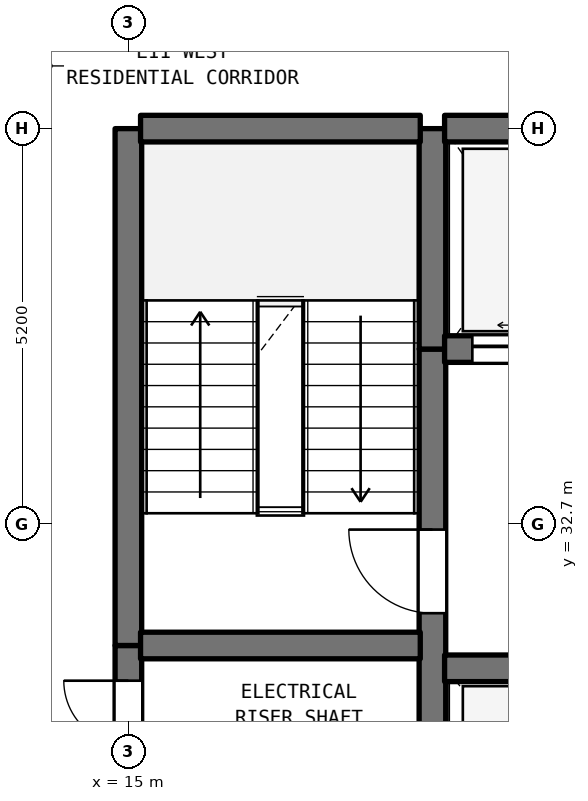
"""IFC4 building model, lengths in metres.
Left out: names, types, materials, properties, quantities, classifications, styles, units other than length and angle.
Written with IfcOpenShell. Run it as: python <this file> out.ifc"""

import sys

from ifc_helpers import new_model, si_unit, direction, frame, frame_2d, origin, place, context, subcontext, project, spatial, rectangle, extrude, element, fill, save


model = new_model("IFC4")
c1 = context("Model", 3, precision=1e-05, world=origin(), true_north=direction((0.0, 1.0)))
c2 = subcontext(c1, "Body", "Model", "MODEL_VIEW")
j1 = project(units=[si_unit("LENGTHUNIT", "METRE"), si_unit("PLANEANGLEUNIT", "RADIAN")], contexts=[c1])
p1 = place(None, origin())
s1 = spatial("IfcSite", under=j1, at=p1, CompositionType="ELEMENT")
p2 = place(p1, origin())
s2 = spatial("IfcBuilding", under=s1, at=p2, CompositionType="ELEMENT")
p3 = place(p2, frame((0.0, 0.0, 49.9)))
s3 = spatial("IfcBuildingStorey", under=s2, at=p3, CompositionType="ELEMENT", Elevation=49.9)
p4 = place(p3, frame((15.0, 29.5, 0.0), z_axis=(0.0, 0.0, 1.0), x_axis=(0.0, 1.0, 0.0)))
e1 = element("IfcWall", 1, at=p4, inside=s3, PredefinedType="SHEAR", context=c2, shape_type="SweptSolid", body=[
    extrude(rectangle(XDim=1.6, YDim=0.35, at=frame_2d((0.8, 0.0))), origin(), (0.0, 0.0, 1.0), 3.385),
])
p5 = place(p4, frame((0.287, 0.0, 0.0)))
e2 = element("IfcOpeningElement", 2, at=p5, cuts=e1, PredefinedType="OPENING", context=c2, shape_type="SweptSolid", body=[
    extrude(rectangle(XDim=0.85, YDim=2.1, at=frame_2d((0.425, 1.05))), frame((0.0, 0.185, 0.0), z_axis=(0.0, -1.0, 0.0), x_axis=(1.0, 0.0, 0.0)), (0.0, 0.0, 1.0), 0.37),
])
p6 = place(p3, frame((15.0, 31.1, 0.0), z_axis=(0.0, 0.0, 1.0), x_axis=(0.0, 1.0, 0.0)))
e3 = element("IfcWall", 3, at=p6, inside=s3, PredefinedType="SHEAR", context=c2, shape_type="SweptSolid", body=[
    extrude(rectangle(XDim=6.8, YDim=0.35, at=frame_2d((3.4, 0.0))), origin(), (0.0, 0.0, 1.0), 3.385),
])
p7 = place(p3, frame((19.0, 29.5, 0.0), z_axis=(0.0, 0.0, 1.0), x_axis=(0.0, 1.0, 0.0)))
e4 = element("IfcWall", 4, at=p7, inside=s3, PredefinedType="SHEAR", context=c2, shape_type="SweptSolid", body=[
    extrude(rectangle(XDim=5.5, YDim=0.35, at=frame_2d((2.75, 0.0))), origin(), (0.0, 0.0, 1.0), 3.385),
])
p8 = place(p7, frame((2.025, 0.0, 0.0)))
e5 = element("IfcOpeningElement", 5, at=p8, cuts=e4, PredefinedType="OPENING", context=c2, shape_type="SweptSolid", body=[
    extrude(rectangle(XDim=1.1, YDim=2.15, at=frame_2d((0.55, 1.075))), frame((0.0, 0.185, 0.0), z_axis=(0.0, -1.0, 0.0), x_axis=(1.0, 0.0, 0.0)), (0.0, 0.0, 1.0), 0.37),
])
p9 = place(p3, frame((19.0, 35.0, 0.0), z_axis=(0.0, 0.0, 1.0), x_axis=(0.0, 1.0, 0.0)))
e6 = element("IfcWall", 6, at=p9, inside=s3, PredefinedType="SHEAR", context=c2, shape_type="SweptSolid", body=[
    extrude(rectangle(XDim=2.9, YDim=0.35, at=frame_2d((1.45, 0.0))), origin(), (0.0, 0.0, 1.0), 3.385),
])
p10 = place(p3, frame((19.16, 30.8, 0.0), z_axis=(0.0, 0.0, 1.0), x_axis=(1.0, 0.0, 0.0)))
e7 = element("IfcWall", 7, at=p10, inside=s3, PredefinedType="SHEAR", context=c2, shape_type="SweptSolid", body=[
    extrude(rectangle(XDim=4.48, YDim=0.35, at=frame_2d((2.24, 0.0))), origin(), (0.0, 0.0, 1.0), 3.385),
])
p11 = place(p3, frame((15.16, 31.1, 0.0), z_axis=(0.0, 0.0, 1.0), x_axis=(1.0, 0.0, 0.0)))
e8 = element("IfcWall", 8, at=p11, inside=s3, PredefinedType="SHEAR", context=c2, shape_type="SweptSolid", body=[
    extrude(rectangle(XDim=3.68, YDim=0.35, at=frame_2d((1.84, 0.0))), origin(), (0.0, 0.0, 1.0), 3.385),
])
p12 = place(p3, frame((19.16, 35.0, 0.0), z_axis=(0.0, 0.0, 1.0), x_axis=(1.0, 0.0, 0.0)))
e9 = element("IfcWall", 9, at=p12, inside=s3, PredefinedType="SHEAR", context=c2, shape_type="SweptSolid", body=[
    extrude(rectangle(XDim=11.48, YDim=0.35, at=frame_2d((5.74, 0.0))), origin(), (0.0, 0.0, 1.0), 3.385),
])
p13 = place(p12, frame((0.365, 0.0, 0.0)))
e10 = element("IfcOpeningElement", 10, at=p13, cuts=e9, PredefinedType="OPENING", context=c2, shape_type="SweptSolid", body=[
    extrude(rectangle(XDim=1.35, YDim=2.2, at=frame_2d((0.675, 1.1))), frame((0.0, 0.185, 0.0), z_axis=(0.0, -1.0, 0.0), x_axis=(1.0, 0.0, 0.0)), (0.0, 0.0, 1.0), 0.37),
])
p14 = place(p12, frame((2.765, 0.0, 0.0)))
e11 = element("IfcOpeningElement", 11, at=p14, cuts=e9, PredefinedType="OPENING", context=c2, shape_type="SweptSolid", body=[
    extrude(rectangle(XDim=1.35, YDim=2.2, at=frame_2d((0.675, 1.1))), frame((0.0, 0.185, 0.0), z_axis=(0.0, -1.0, 0.0), x_axis=(1.0, 0.0, 0.0)), (0.0, 0.0, 1.0), 0.37),
])
p15 = place(p12, frame((4.915, 0.0, 0.0)))
e12 = element("IfcOpeningElement", 12, at=p15, cuts=e9, PredefinedType="OPENING", context=c2, shape_type="SweptSolid", body=[
    extrude(rectangle(XDim=1.2, YDim=2.2, at=frame_2d((0.6, 1.1))), frame((0.0, 0.185, 0.0), z_axis=(0.0, -1.0, 0.0), x_axis=(1.0, 0.0, 0.0)), (0.0, 0.0, 1.0), 0.37),
])
p16 = place(p12, frame((6.665, 0.0, 0.0)))
e13 = element("IfcOpeningElement", 13, at=p16, cuts=e9, PredefinedType="OPENING", context=c2, shape_type="SweptSolid", body=[
    extrude(rectangle(XDim=1.2, YDim=2.2, at=frame_2d((0.6, 1.1))), frame((0.0, 0.185, 0.0), z_axis=(0.0, -1.0, 0.0), x_axis=(1.0, 0.0, 0.0)), (0.0, 0.0, 1.0), 0.37),
])
p17 = place(p12, frame((8.415, 0.0, 0.0)))
e14 = element("IfcOpeningElement", 14, at=p17, cuts=e9, PredefinedType="OPENING", context=c2, shape_type="SweptSolid", body=[
    extrude(rectangle(XDim=1.2, YDim=2.2, at=frame_2d((0.6, 1.1))), frame((0.0, 0.185, 0.0), z_axis=(0.0, -1.0, 0.0), x_axis=(1.0, 0.0, 0.0)), (0.0, 0.0, 1.0), 0.37),
])
p18 = place(p12, frame((10.16, 0.0, 0.0)))
e15 = element("IfcOpeningElement", 15, at=p18, cuts=e9, PredefinedType="OPENING", context=c2, shape_type="SweptSolid", body=[
    extrude(rectangle(XDim=1.2, YDim=2.2, at=frame_2d((0.6, 1.1))), frame((0.0, 0.185, 0.0), z_axis=(0.0, -1.0, 0.0), x_axis=(1.0, 0.0, 0.0)), (0.0, 0.0, 1.0), 0.37),
])
p19 = place(p3, frame((15.16, 37.9, 0.0), z_axis=(0.0, 0.0, 1.0), x_axis=(1.0, 0.0, 0.0)))
e16 = element("IfcWall", 16, at=p19, inside=s3, PredefinedType="SHEAR", context=c2, shape_type="SweptSolid", body=[
    extrude(rectangle(XDim=3.68, YDim=0.35, at=frame_2d((1.84, 0.0))), origin(), (0.0, 0.0, 1.0), 3.385),
])
p20 = place(p3, frame((19.16, 37.9, 0.0), z_axis=(0.0, 0.0, 1.0), x_axis=(1.0, 0.0, 0.0)))
e17 = element("IfcWall", 17, at=p20, inside=s3, PredefinedType="SHEAR", context=c2, shape_type="SweptSolid", body=[
    extrude(rectangle(XDim=11.48, YDim=0.35, at=frame_2d((5.74, 0.0))), origin(), (0.0, 0.0, 1.0), 3.385),
])
p21 = place(p5, origin())
e18 = element("IfcDoor", 18, at=p21, inside=s3, OperationType="SINGLE_SWING_RIGHT", PredefinedType="DOOR", context=c2, shape_type="SweptSolid", body=[
    extrude(rectangle(XDim=0.85, YDim=2.1, at=frame_2d((0.425, 1.05))), frame((0.0, 0.025, 0.0), z_axis=(0.0, -1.0, 0.0), x_axis=(1.0, 0.0, 0.0)), (0.0, 0.0, 1.0), 0.05),
])
fill(e2, e18)
p22 = place(p8, origin())
e19 = element("IfcDoor", 19, at=p22, inside=s3, OperationType="SINGLE_SWING_RIGHT", PredefinedType="DOOR", context=c2, shape_type="SweptSolid", body=[
    extrude(rectangle(XDim=1.1, YDim=2.15, at=frame_2d((0.55, 1.075))), frame((0.0, 0.025, 0.0), z_axis=(0.0, -1.0, 0.0), x_axis=(1.0, 0.0, 0.0)), (0.0, 0.0, 1.0), 0.05),
])
fill(e5, e19)
p23 = place(p13, origin())
e20 = element("IfcDoor", 20, at=p23, inside=s3, OperationType="DOUBLE_DOOR_SLIDING", PredefinedType="DOOR", context=c2, shape_type="SweptSolid", body=[
    extrude(rectangle(XDim=1.35, YDim=2.2, at=frame_2d((0.675, 1.1))), frame((0.0, 0.025, 0.0), z_axis=(0.0, -1.0, 0.0), x_axis=(1.0, 0.0, 0.0)), (0.0, 0.0, 1.0), 0.05),
])
fill(e10, e20)
save(model, sys.argv[1])
